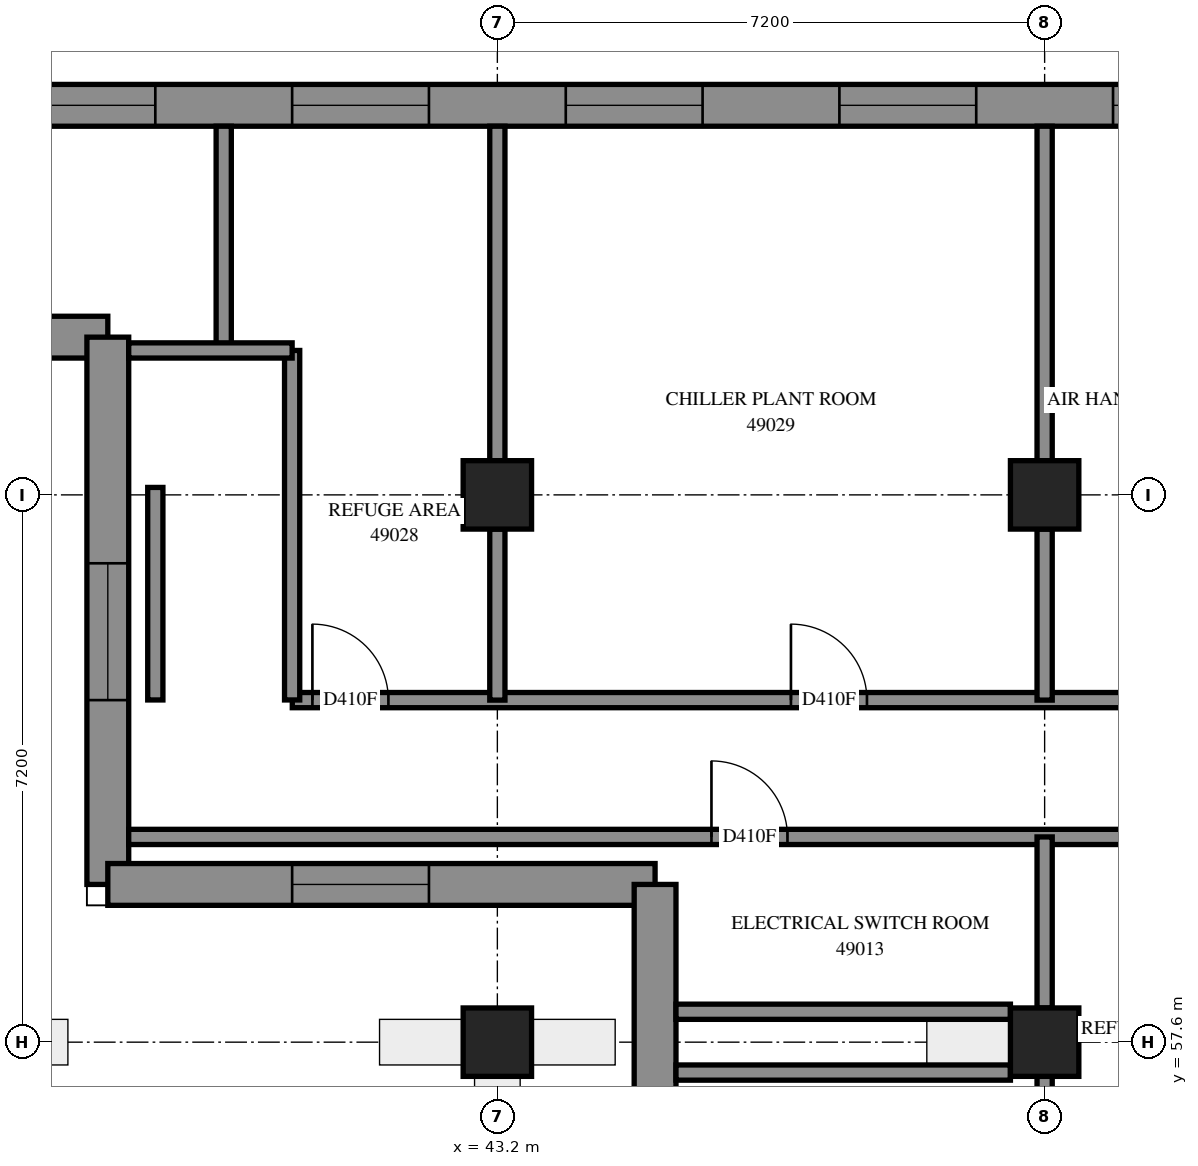
"""IFC4 building model, lengths in metres.
Left out: names, types, materials, properties, quantities, classifications, styles, units other than length and angle.
Written with IfcOpenShell. Run it as: python <this file> out.ifc"""

import sys

from ifc_helpers import new_model, si_unit, direction, frame, frame_2d, origin, origin_2d, place, context, subcontext, project, spatial, polyline, rectangle, outline, extrude, element, fill, save


model = new_model("IFC4")
c1 = context("Model", 3, precision=1e-05, world=origin(), true_north=direction((0.0, 1.0)))
c2 = subcontext(c1, "Body", "Model", "MODEL_VIEW")
j1 = project(units=[si_unit("LENGTHUNIT", "METRE"), si_unit("PLANEANGLEUNIT", "RADIAN")], contexts=[c1])
p1 = place(None, origin())
s1 = spatial("IfcSite", under=j1, at=p1, CompositionType="ELEMENT")
p2 = place(p1, origin())
s2 = spatial("IfcBuilding", under=s1, at=p2, CompositionType="ELEMENT")
p3 = place(p2, frame((0.0, 0.0, 180.4)))
s3 = spatial("IfcBuildingStorey", under=s2, at=p3, CompositionType="ELEMENT", Elevation=180.4)
p4 = place(p3, frame((43.2, 57.6, -0.3), z_axis=(0.0, 0.0, 1.0), x_axis=(1.0, 0.0, 0.0)))
e1 = element("IfcColumn", 1, at=p4, inside=s3, PredefinedType="COLUMN", context=c2, shape_type="SweptSolid", body=[
    extrude(rectangle(XDim=0.9, YDim=0.9, at=origin_2d()), origin(), (0.0, 0.0, 1.0), 5.0),
])
for number, where, z_axis, x_axis in (
    (2, (43.2, 64.8, 0.0), (0.0, 0.0, 1.0), (1.0, 0.0, 0.0)),
    (3, (50.4, 57.6, 0.0), (0.0, 0.0, 1.0), (1.0, 0.0, 0.0)),
    (4, (50.4, 64.8, 0.0), (0.0, 0.0, 1.0), (1.0, 0.0, 0.0)),
):
    element("IfcColumn", number, at=place(p3, frame(where, z_axis=z_axis, x_axis=x_axis)), inside=s3, PredefinedType="COLUMN", context=c2, shape_type="SweptSolid", body=[
        extrude(rectangle(XDim=0.9, YDim=0.9, at=origin_2d()), origin(), (0.0, 0.0, 1.0), 4.7),
    ])
p5 = place(p3, frame((78.341, 69.925, 0.0), z_axis=(0.0, 0.0, 1.0), x_axis=(-1.0, 0.0, 0.0)))
e5 = element("IfcWall", 5, at=p5, inside=s3, PredefinedType="SOLIDWALL", context=c2, shape_type="SweptSolid", body=[
    extrude(outline(polyline([(-0.114, -0.275), (54.941, -0.275), (54.391, 0.275), (0.114, 0.275), (-0.114, -0.275)])), origin(), (0.0, 0.0, 1.0), 4.7),
])
p6 = place(p5, frame((0.627, 0.0, 0.9)))
e6 = element("IfcOpeningElement", 6, at=p6, cuts=e5, PredefinedType="OPENING", context=c2, shape_type="SweptSolid", body=[
    extrude(rectangle(XDim=1.8, YDim=3.6, at=frame_2d((0.9, 1.8))), frame((0.0, 0.285, 0.0), z_axis=(0.0, -1.0, 0.0), x_axis=(1.0, 0.0, 0.0)), (0.0, 0.0, 1.0), 0.57),
])
p7 = place(p5, frame((3.64, 0.0, 0.9)))
e7 = element("IfcOpeningElement", 7, at=p7, cuts=e5, PredefinedType="OPENING", context=c2, shape_type="SweptSolid", body=[
    extrude(rectangle(XDim=1.8, YDim=3.6, at=frame_2d((0.9, 1.8))), frame((0.0, 0.285, 0.0), z_axis=(0.0, -1.0, 0.0), x_axis=(1.0, 0.0, 0.0)), (0.0, 0.0, 1.0), 0.57),
])
p8 = place(p5, frame((7.24, 0.0, 0.9)))
e8 = element("IfcOpeningElement", 8, at=p8, cuts=e5, PredefinedType="OPENING", context=c2, shape_type="SweptSolid", body=[
    extrude(rectangle(XDim=1.8, YDim=3.6, at=frame_2d((0.9, 1.8))), frame((0.0, 0.285, 0.0), z_axis=(0.0, -1.0, 0.0), x_axis=(1.0, 0.0, 0.0)), (0.0, 0.0, 1.0), 0.57),
])
p9 = place(p5, frame((10.841, 0.0, 0.9)))
e9 = element("IfcOpeningElement", 9, at=p9, cuts=e5, PredefinedType="OPENING", context=c2, shape_type="SweptSolid", body=[
    extrude(rectangle(XDim=1.8, YDim=3.6, at=frame_2d((0.9, 1.8))), frame((0.0, 0.285, 0.0), z_axis=(0.0, -1.0, 0.0), x_axis=(1.0, 0.0, 0.0)), (0.0, 0.0, 1.0), 0.57),
])
p10 = place(p5, frame((14.441, 0.0, 0.9)))
e10 = element("IfcOpeningElement", 10, at=p10, cuts=e5, PredefinedType="OPENING", context=c2, shape_type="SweptSolid", body=[
    extrude(rectangle(XDim=1.8, YDim=3.6, at=frame_2d((0.9, 1.8))), frame((0.0, 0.285, 0.0), z_axis=(0.0, -1.0, 0.0), x_axis=(1.0, 0.0, 0.0)), (0.0, 0.0, 1.0), 0.57),
])
p11 = place(p5, frame((18.041, 0.0, 0.9)))
e11 = element("IfcOpeningElement", 11, at=p11, cuts=e5, PredefinedType="OPENING", context=c2, shape_type="SweptSolid", body=[
    extrude(rectangle(XDim=1.8, YDim=3.6, at=frame_2d((0.9, 1.8))), frame((0.0, 0.285, 0.0), z_axis=(0.0, -1.0, 0.0), x_axis=(1.0, 0.0, 0.0)), (0.0, 0.0, 1.0), 0.57),
])
p12 = place(p5, frame((21.64, 0.0, 0.9)))
e12 = element("IfcOpeningElement", 12, at=p12, cuts=e5, PredefinedType="OPENING", context=c2, shape_type="SweptSolid", body=[
    extrude(rectangle(XDim=1.8, YDim=3.6, at=frame_2d((0.9, 1.8))), frame((0.0, 0.285, 0.0), z_axis=(0.0, -1.0, 0.0), x_axis=(1.0, 0.0, 0.0)), (0.0, 0.0, 1.0), 0.57),
])
p13 = place(p5, frame((25.241, 0.0, 0.9)))
e13 = element("IfcOpeningElement", 13, at=p13, cuts=e5, PredefinedType="OPENING", context=c2, shape_type="SweptSolid", body=[
    extrude(rectangle(XDim=1.8, YDim=3.6, at=frame_2d((0.9, 1.8))), frame((0.0, 0.285, 0.0), z_axis=(0.0, -1.0, 0.0), x_axis=(1.0, 0.0, 0.0)), (0.0, 0.0, 1.0), 0.57),
])
p14 = place(p5, frame((28.84, 0.0, 0.9)))
e14 = element("IfcOpeningElement", 14, at=p14, cuts=e5, PredefinedType="OPENING", context=c2, shape_type="SweptSolid", body=[
    extrude(rectangle(XDim=1.8, YDim=3.6, at=frame_2d((0.9, 1.8))), frame((0.0, 0.285, 0.0), z_axis=(0.0, -1.0, 0.0), x_axis=(1.0, 0.0, 0.0)), (0.0, 0.0, 1.0), 0.57),
])
p15 = place(p5, frame((32.441, 0.0, 0.9)))
e15 = element("IfcOpeningElement", 15, at=p15, cuts=e5, PredefinedType="OPENING", context=c2, shape_type="SweptSolid", body=[
    extrude(rectangle(XDim=1.8, YDim=3.6, at=frame_2d((0.9, 1.8))), frame((0.0, 0.285, 0.0), z_axis=(0.0, -1.0, 0.0), x_axis=(1.0, 0.0, 0.0)), (0.0, 0.0, 1.0), 0.57),
])
p16 = place(p5, frame((36.041, 0.0, 0.9)))
e16 = element("IfcOpeningElement", 16, at=p16, cuts=e5, PredefinedType="OPENING", context=c2, shape_type="SweptSolid", body=[
    extrude(rectangle(XDim=1.8, YDim=3.6, at=frame_2d((0.9, 1.8))), frame((0.0, 0.285, 0.0), z_axis=(0.0, -1.0, 0.0), x_axis=(1.0, 0.0, 0.0)), (0.0, 0.0, 1.0), 0.57),
])
p17 = place(p5, frame((39.641, 0.0, 0.9)))
e17 = element("IfcOpeningElement", 17, at=p17, cuts=e5, PredefinedType="OPENING", context=c2, shape_type="SweptSolid", body=[
    extrude(rectangle(XDim=1.8, YDim=3.6, at=frame_2d((0.9, 1.8))), frame((0.0, 0.285, 0.0), z_axis=(0.0, -1.0, 0.0), x_axis=(1.0, 0.0, 0.0)), (0.0, 0.0, 1.0), 0.57),
])
p18 = place(p5, frame((43.24, 0.0, 0.9)))
e18 = element("IfcOpeningElement", 18, at=p18, cuts=e5, PredefinedType="OPENING", context=c2, shape_type="SweptSolid", body=[
    extrude(rectangle(XDim=1.8, YDim=3.6, at=frame_2d((0.9, 1.8))), frame((0.0, 0.285, 0.0), z_axis=(0.0, -1.0, 0.0), x_axis=(1.0, 0.0, 0.0)), (0.0, 0.0, 1.0), 0.57),
])
p19 = place(p5, frame((46.84, 0.0, 0.9)))
e19 = element("IfcOpeningElement", 19, at=p19, cuts=e5, PredefinedType="OPENING", context=c2, shape_type="SweptSolid", body=[
    extrude(rectangle(XDim=1.8, YDim=3.6, at=frame_2d((0.9, 1.8))), frame((0.0, 0.285, 0.0), z_axis=(0.0, -1.0, 0.0), x_axis=(1.0, 0.0, 0.0)), (0.0, 0.0, 1.0), 0.57),
])
p20 = place(p5, frame((50.441, 0.0, 0.9)))
e20 = element("IfcOpeningElement", 20, at=p20, cuts=e5, PredefinedType="OPENING", context=c2, shape_type="SweptSolid", body=[
    extrude(rectangle(XDim=1.8, YDim=3.6, at=frame_2d((0.9, 1.8))), frame((0.0, 0.285, 0.0), z_axis=(0.0, -1.0, 0.0), x_axis=(1.0, 0.0, 0.0)), (0.0, 0.0, 1.0), 0.57),
])
p21 = place(p3, frame((23.675, 66.875, 0.0), z_axis=(0.0, 0.0, 1.0), x_axis=(1.0, 0.0, 0.0)))
e21 = element("IfcWall", 21, at=p21, inside=s3, PredefinedType="SOLIDWALL", context=c2, shape_type="SweptSolid", body=[
    extrude(outline(polyline([(-0.275, -0.275), (14.125, -0.275), (14.675, 0.275), (0.275, 0.275), (-0.275, -0.275)])), origin(), (0.0, 0.0, 1.0), 4.7),
])
p22 = place(p21, frame((2.425, 0.0, 0.9)))
e22 = element("IfcOpeningElement", 22, at=p22, cuts=e21, PredefinedType="OPENING", context=c2, shape_type="SweptSolid", body=[
    extrude(rectangle(XDim=1.8, YDim=3.6, at=frame_2d((0.9, 1.8))), frame((0.0, 0.285, 0.0), z_axis=(0.0, -1.0, 0.0), x_axis=(1.0, 0.0, 0.0)), (0.0, 0.0, 1.0), 0.57),
])
p23 = place(p21, frame((6.025, 0.0, 0.9)))
e23 = element("IfcOpeningElement", 23, at=p23, cuts=e21, PredefinedType="OPENING", context=c2, shape_type="SweptSolid", body=[
    extrude(rectangle(XDim=1.8, YDim=3.6, at=frame_2d((0.9, 1.8))), frame((0.0, 0.285, 0.0), z_axis=(0.0, -1.0, 0.0), x_axis=(1.0, 0.0, 0.0)), (0.0, 0.0, 1.0), 0.57),
])
p24 = place(p21, frame((9.925, 0.0, 0.9)))
e24 = element("IfcOpeningElement", 24, at=p24, cuts=e21, PredefinedType="OPENING", context=c2, shape_type="SweptSolid", body=[
    extrude(rectangle(XDim=1.8, YDim=3.6, at=frame_2d((0.9, 1.8))), frame((0.0, 0.285, 0.0), z_axis=(0.0, -1.0, 0.0), x_axis=(1.0, 0.0, 0.0)), (0.0, 0.0, 1.0), 0.57),
])
p25 = place(p3, frame((38.075, 66.875, 0.0), z_axis=(0.0, 0.0, 1.0), x_axis=(0.0, -1.0, 0.0)))
e25 = element("IfcWall", 25, at=p25, inside=s3, PredefinedType="SOLIDWALL", context=c2, shape_type="SweptSolid", body=[
    extrude(outline(polyline([(0.275, -0.275), (7.475, -0.275), (6.925, 0.275), (-0.275, 0.275), (0.275, -0.275)])), origin(), (0.0, 0.0, 1.0), 4.7),
])
p26 = place(p25, frame((2.975, 0.0, 0.9)))
e26 = element("IfcOpeningElement", 26, at=p26, cuts=e25, PredefinedType="OPENING", context=c2, shape_type="SweptSolid", body=[
    extrude(rectangle(XDim=1.8, YDim=3.6, at=frame_2d((0.9, 1.8))), frame((0.0, 0.285, 0.0), z_axis=(0.0, -1.0, 0.0), x_axis=(1.0, 0.0, 0.0)), (0.0, 0.0, 1.0), 0.57),
])
p27 = place(p3, frame((38.075, 59.675, 0.0), z_axis=(0.0, 0.0, 1.0), x_axis=(1.0, 0.0, 0.0)))
e27 = element("IfcWall", 27, at=p27, inside=s3, PredefinedType="SOLIDWALL", context=c2, shape_type="SweptSolid", body=[
    extrude(outline(polyline([(-0.275, -0.275), (6.925, -0.275), (7.475, 0.275), (0.275, 0.275), (-0.275, -0.275)])), origin(), (0.0, 0.0, 1.0), 4.7),
])
p28 = place(p27, frame((2.425, 0.0, 0.9)))
e28 = element("IfcOpeningElement", 28, at=p28, cuts=e27, PredefinedType="OPENING", context=c2, shape_type="SweptSolid", body=[
    extrude(rectangle(XDim=1.8, YDim=3.6, at=frame_2d((0.9, 1.8))), frame((0.0, 0.285, 0.0), z_axis=(0.0, -1.0, 0.0), x_axis=(1.0, 0.0, 0.0)), (0.0, 0.0, 1.0), 0.57),
])
p29 = place(p3, frame((45.275, 59.675, 0.0), z_axis=(0.0, 0.0, 1.0), x_axis=(0.0, -1.0, 0.0)))
e29 = element("IfcWall", 29, at=p29, inside=s3, PredefinedType="SOLIDWALL", context=c2, shape_type="SweptSolid", body=[
    extrude(outline(polyline([(0.275, -0.275), (7.475, -0.275), (6.925, 0.275), (-0.275, 0.275), (0.275, -0.275)])), origin(), (0.0, 0.0, 1.0), 4.7),
])
p30 = place(p29, frame((2.975, 0.0, 0.9)))
e30 = element("IfcOpeningElement", 30, at=p30, cuts=e29, PredefinedType="OPENING", context=c2, shape_type="SweptSolid", body=[
    extrude(rectangle(XDim=1.8, YDim=3.6, at=frame_2d((0.9, 1.8))), frame((0.0, 0.285, 0.0), z_axis=(0.0, -1.0, 0.0), x_axis=(1.0, 0.0, 0.0)), (0.0, 0.0, 1.0), 0.57),
])
p31 = place(p3, frame((40.502, 62.1, 0.0), z_axis=(0.0, 0.0, 1.0), x_axis=(1.0, 0.0, 0.0)))
e31 = element("IfcWall", 31, at=p31, inside=s3, PredefinedType="PARTITIONING", context=c2, shape_type="SweptSolid", body=[
    extrude(rectangle(XDim=14.748, YDim=0.2, at=frame_2d((7.374, 0.0))), origin(), (0.0, 0.0, 1.0), 4.7),
])
p32 = place(p31, frame((0.265, 0.0, 0.0)))
e32 = element("IfcOpeningElement", 32, at=p32, cuts=e31, PredefinedType="OPENING", context=c2, shape_type="SweptSolid", body=[
    extrude(rectangle(XDim=1.0, YDim=2.1, at=frame_2d((0.5, 1.05))), frame((0.0, 0.11, 0.0), z_axis=(0.0, -1.0, 0.0), x_axis=(1.0, 0.0, 0.0)), (0.0, 0.0, 1.0), 0.22),
])
p33 = place(p31, frame((6.561, 0.0, 0.0)))
e33 = element("IfcOpeningElement", 33, at=p33, cuts=e31, PredefinedType="OPENING", context=c2, shape_type="SweptSolid", body=[
    extrude(rectangle(XDim=1.0, YDim=2.1, at=frame_2d((0.5, 1.05))), frame((0.0, 0.11, 0.0), z_axis=(0.0, -1.0, 0.0), x_axis=(1.0, 0.0, 0.0)), (0.0, 0.0, 1.0), 0.22),
])
p34 = place(p31, frame((11.991, 0.0, 0.0)))
e34 = element("IfcOpeningElement", 34, at=p34, cuts=e31, PredefinedType="OPENING", context=c2, shape_type="SweptSolid", body=[
    extrude(rectangle(XDim=1.0, YDim=2.1, at=frame_2d((0.5, 1.05))), frame((0.0, 0.11, 0.0), z_axis=(0.0, -1.0, 0.0), x_axis=(1.0, 0.0, 0.0)), (0.0, 0.0, 1.0), 0.22),
])
p35 = place(p3, frame((38.35, 60.3, 0.0), z_axis=(0.0, 0.0, 1.0), x_axis=(1.0, 0.0, 0.0)))
e35 = element("IfcWall", 35, at=p35, inside=s3, PredefinedType="PARTITIONING", context=c2, shape_type="SweptSolid", body=[
    extrude(rectangle(XDim=14.75, YDim=0.2, at=frame_2d((7.375, 0.0))), origin(), (0.0, 0.0, 1.0), 4.7),
])
p36 = place(p35, frame((7.667, 0.0, 0.0)))
e36 = element("IfcOpeningElement", 36, at=p36, cuts=e35, PredefinedType="OPENING", context=c2, shape_type="SweptSolid", body=[
    extrude(rectangle(XDim=1.0, YDim=2.1, at=frame_2d((0.5, 1.05))), frame((0.0, 0.11, 0.0), z_axis=(0.0, -1.0, 0.0), x_axis=(1.0, 0.0, 0.0)), (0.0, 0.0, 1.0), 0.22),
])
p37 = place(p35, frame((13.613, 0.0, 0.0)))
e37 = element("IfcOpeningElement", 37, at=p37, cuts=e35, PredefinedType="OPENING", context=c2, shape_type="SweptSolid", body=[
    extrude(rectangle(XDim=1.0, YDim=2.1, at=frame_2d((0.5, 1.05))), frame((0.0, 0.11, 0.0), z_axis=(0.0, -1.0, 0.0), x_axis=(1.0, 0.0, 0.0)), (0.0, 0.0, 1.0), 0.22),
])
p38 = place(p3, frame((40.5, 62.102, 0.0), z_axis=(0.0, 0.0, 1.0), x_axis=(0.0, 1.0, 0.0)))
e38 = element("IfcWall", 38, at=p38, inside=s3, PredefinedType="PARTITIONING", context=c2, shape_type="SweptSolid", body=[
    extrude(rectangle(XDim=4.598, YDim=0.2, at=frame_2d((2.299, 0.0))), origin(), (0.0, 0.0, 1.0), 4.7),
])
for number, where, z_axis, x_axis in (
    (39, (45.55, 57.2, 0.0), (0.0, 0.0, 1.0), (1.0, 0.0, 0.0)),
    (40, (45.55, 58.0, 0.0), (0.0, 0.0, 1.0), (1.0, 0.0, 0.0)),
    (41, (43.2, 65.25, 0.0), (0.0, 0.0, 1.0), (0.0, 1.0, 0.0)),
    (42, (50.4, 65.25, 0.0), (0.0, 0.0, 1.0), (0.0, 1.0, 0.0)),
):
    element("IfcWall", number, at=place(p3, frame(where, z_axis=z_axis, x_axis=x_axis)), inside=s3, PredefinedType="PARTITIONING", context=c2, shape_type="SweptSolid", body=[
        extrude(rectangle(XDim=4.4, YDim=0.2, at=frame_2d((2.2, 0.0))), origin(), (0.0, 0.0, 1.0), 4.7),
    ])
p39 = place(p3, frame((39.6, 66.7, 0.0), z_axis=(0.0, 0.0, 1.0), x_axis=(0.0, 1.0, 0.0)))
e43 = element("IfcWall", 43, at=p39, inside=s3, PredefinedType="PARTITIONING", context=c2, shape_type="SweptSolid", body=[
    extrude(rectangle(XDim=2.95, YDim=0.2, at=frame_2d((1.475, 0.0))), origin(), (0.0, 0.0, 1.0), 4.7),
])
p40 = place(p3, frame((38.7, 62.102, 0.0), z_axis=(0.0, 0.0, 1.0), x_axis=(0.0, 1.0, 0.0)))
e44 = element("IfcWall", 44, at=p40, inside=s3, PredefinedType="PARTITIONING", context=c2, shape_type="SweptSolid", body=[
    extrude(rectangle(XDim=2.796, YDim=0.2, at=frame_2d((1.398, 0.0))), origin(), (0.0, 0.0, 1.0), 4.7),
])
for number, where, z_axis, x_axis in (
    (45, (50.4, 54.9, 0.0), (0.0, 0.0, 1.0), (0.0, 1.0, 0.0)),
    (46, (50.4, 58.05, 0.0), (0.0, 0.0, 1.0), (0.0, 1.0, 0.0)),
    (47, (43.2, 62.1, 0.0), (0.0, 0.0, 1.0), (0.0, 1.0, 0.0)),
    (48, (50.4, 62.1, 0.0), (0.0, 0.0, 1.0), (0.0, 1.0, 0.0)),
):
    element("IfcWall", number, at=place(p3, frame(where, z_axis=z_axis, x_axis=x_axis)), inside=s3, PredefinedType="PARTITIONING", context=c2, shape_type="SweptSolid", body=[
        extrude(rectangle(XDim=2.25, YDim=0.2, at=frame_2d((1.125, 0.0))), origin(), (0.0, 0.0, 1.0), 4.7),
    ])
p41 = place(p3, frame((38.35, 66.7, 0.0), z_axis=(0.0, 0.0, 1.0), x_axis=(1.0, 0.0, 0.0)))
e49 = element("IfcWall", 49, at=p41, inside=s3, PredefinedType="PARTITIONING", context=c2, shape_type="SweptSolid", body=[
    extrude(rectangle(XDim=2.15, YDim=0.2, at=frame_2d((1.075, 0.0))), origin(), (0.0, 0.0, 1.0), 4.7),
])
p42 = place(p13, origin())
e50 = element("IfcWindow", 50, at=p42, inside=s3, PartitioningType="SINGLE_PANEL", PredefinedType="WINDOW", context=c2, shape_type="SweptSolid", body=[
    extrude(rectangle(XDim=1.8, YDim=3.6, at=frame_2d((0.9, 1.8))), frame((0.0, 0.155, 0.0), z_axis=(0.0, -1.0, 0.0), x_axis=(1.0, 0.0, 0.0)), (0.0, 0.0, 1.0), 0.06),
])
fill(e13, e50)
p43 = place(p14, origin())
e51 = element("IfcWindow", 51, at=p43, inside=s3, PartitioningType="SINGLE_PANEL", PredefinedType="WINDOW", context=c2, shape_type="SweptSolid", body=[
    extrude(rectangle(XDim=1.8, YDim=3.6, at=frame_2d((0.9, 1.8))), frame((0.0, 0.155, 0.0), z_axis=(0.0, -1.0, 0.0), x_axis=(1.0, 0.0, 0.0)), (0.0, 0.0, 1.0), 0.06),
])
fill(e14, e51)
p44 = place(p15, origin())
e52 = element("IfcWindow", 52, at=p44, inside=s3, PartitioningType="SINGLE_PANEL", PredefinedType="WINDOW", context=c2, shape_type="SweptSolid", body=[
    extrude(rectangle(XDim=1.8, YDim=3.6, at=frame_2d((0.9, 1.8))), frame((0.0, 0.155, 0.0), z_axis=(0.0, -1.0, 0.0), x_axis=(1.0, 0.0, 0.0)), (0.0, 0.0, 1.0), 0.06),
])
fill(e15, e52)
p45 = place(p16, origin())
e53 = element("IfcWindow", 53, at=p45, inside=s3, PartitioningType="SINGLE_PANEL", PredefinedType="WINDOW", context=c2, shape_type="SweptSolid", body=[
    extrude(rectangle(XDim=1.8, YDim=3.6, at=frame_2d((0.9, 1.8))), frame((0.0, 0.155, 0.0), z_axis=(0.0, -1.0, 0.0), x_axis=(1.0, 0.0, 0.0)), (0.0, 0.0, 1.0), 0.06),
])
fill(e16, e53)
p46 = place(p17, origin())
e54 = element("IfcWindow", 54, at=p46, inside=s3, PartitioningType="SINGLE_PANEL", PredefinedType="WINDOW", context=c2, shape_type="SweptSolid", body=[
    extrude(rectangle(XDim=1.8, YDim=3.6, at=frame_2d((0.9, 1.8))), frame((0.0, 0.155, 0.0), z_axis=(0.0, -1.0, 0.0), x_axis=(1.0, 0.0, 0.0)), (0.0, 0.0, 1.0), 0.06),
])
fill(e17, e54)
p47 = place(p26, origin())
e55 = element("IfcWindow", 55, at=p47, inside=s3, PartitioningType="SINGLE_PANEL", PredefinedType="WINDOW", context=c2, shape_type="SweptSolid", body=[
    extrude(rectangle(XDim=1.8, YDim=3.6, at=frame_2d((0.9, 1.8))), frame((0.0, 0.155, 0.0), z_axis=(0.0, -1.0, 0.0), x_axis=(1.0, 0.0, 0.0)), (0.0, 0.0, 1.0), 0.06),
])
fill(e26, e55)
p48 = place(p28, origin())
e56 = element("IfcWindow", 56, at=p48, inside=s3, PartitioningType="SINGLE_PANEL", PredefinedType="WINDOW", context=c2, shape_type="SweptSolid", body=[
    extrude(rectangle(XDim=1.8, YDim=3.6, at=frame_2d((0.9, 1.8))), frame((0.0, 0.155, 0.0), z_axis=(0.0, -1.0, 0.0), x_axis=(1.0, 0.0, 0.0)), (0.0, 0.0, 1.0), 0.06),
])
fill(e28, e56)
p49 = place(p36, origin())
e57 = element("IfcDoor", 57, at=p49, inside=s3, OperationType="SINGLE_SWING_RIGHT", PredefinedType="DOOR", context=c2, shape_type="SweptSolid", body=[
    extrude(rectangle(XDim=1.0, YDim=2.1, at=frame_2d((0.5, 1.05))), frame((0.0, 0.025, 0.0), z_axis=(0.0, -1.0, 0.0), x_axis=(1.0, 0.0, 0.0)), (0.0, 0.0, 1.0), 0.05),
])
fill(e36, e57)
p50 = place(p32, origin())
e58 = element("IfcDoor", 58, at=p50, inside=s3, OperationType="SINGLE_SWING_LEFT", PredefinedType="DOOR", context=c2, shape_type="SweptSolid", body=[
    extrude(rectangle(XDim=1.0, YDim=2.1, at=frame_2d((0.5, 1.05))), frame((0.0, 0.025, 0.0), z_axis=(0.0, -1.0, 0.0), x_axis=(1.0, 0.0, 0.0)), (0.0, 0.0, 1.0), 0.05),
])
fill(e32, e58)
p51 = place(p33, origin())
e59 = element("IfcDoor", 59, at=p51, inside=s3, OperationType="SINGLE_SWING_RIGHT", PredefinedType="DOOR", context=c2, shape_type="SweptSolid", body=[
    extrude(rectangle(XDim=1.0, YDim=2.1, at=frame_2d((0.5, 1.05))), frame((0.0, 0.025, 0.0), z_axis=(0.0, -1.0, 0.0), x_axis=(1.0, 0.0, 0.0)), (0.0, 0.0, 1.0), 0.05),
])
fill(e33, e59)
save(model, sys.argv[1])
